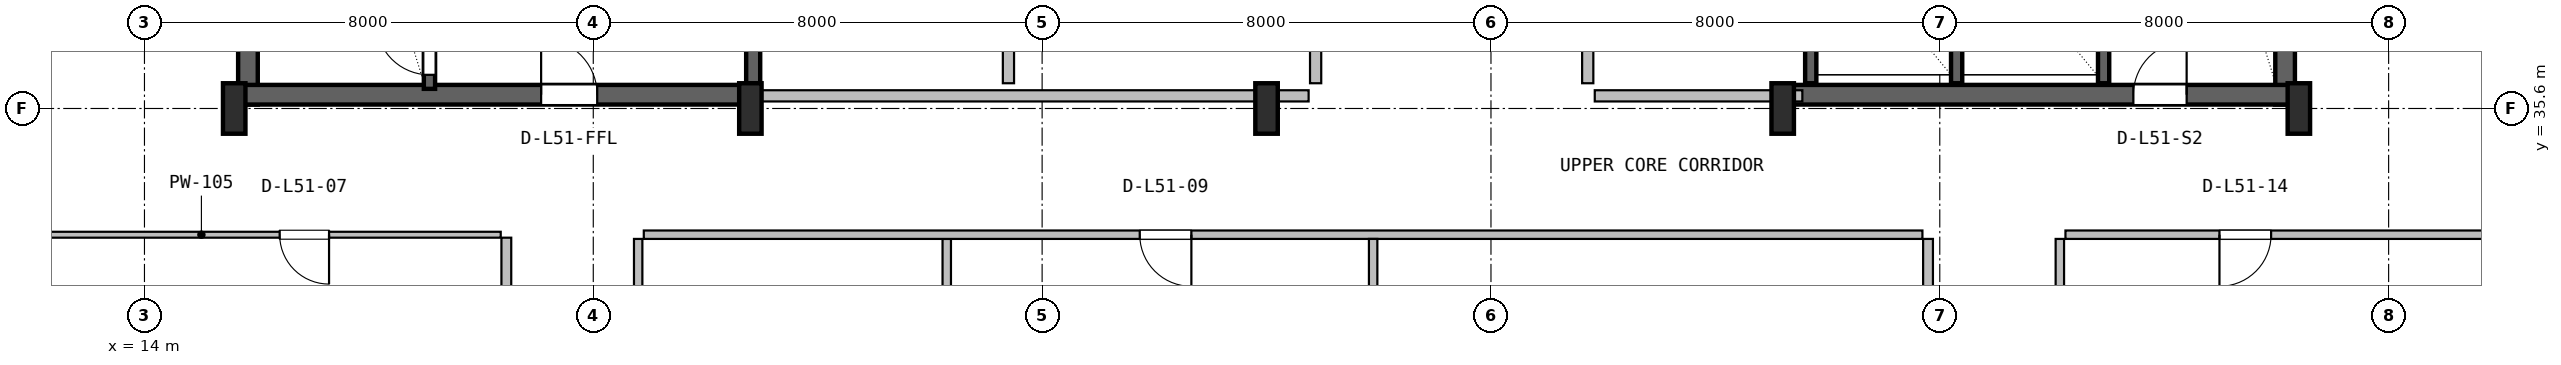
"""IFC4 building model, lengths in metres.
Left out: names, types, materials, properties, quantities, classifications, styles, units other than length and angle.
Written with IfcOpenShell. Run it as: python <this file> out.ifc"""

import sys

from ifc_helpers import new_model, si_unit, direction, frame, frame_2d, origin, origin_2d, place, context, subcontext, project, spatial, rectangle, i_section, extrude, source, transform, mapped, element, fill, save


model = new_model("IFC4")
c1 = context("Model", 3, precision=1e-05, world=origin(), true_north=direction((0.0, 1.0)))
c2 = subcontext(c1, "Body", "Model", "MODEL_VIEW")
j1 = project(units=[si_unit("LENGTHUNIT", "METRE"), si_unit("PLANEANGLEUNIT", "RADIAN")], contexts=[c1])
p1 = place(None, origin())
s1 = spatial("IfcSite", under=j1, at=p1, CompositionType="ELEMENT")
p2 = place(p1, origin())
s2 = spatial("IfcBuilding", under=s1, at=p2, CompositionType="ELEMENT")
p3 = place(p2, frame((0.0, 0.0, 207.4)))
s3 = spatial("IfcBuildingStorey", under=s2, at=p3, CompositionType="ELEMENT", Elevation=207.4)
for number, where, z_axis, x_axis in (
    (1, (15.845, 35.67, 0.0), (0.0, 0.0, 1.0), (0.0, 1.0, 0.0)),
    (2, (52.155, 35.67, 0.0), (0.0, 0.0, 1.0), (0.0, 1.0, 0.0)),
):
    element("IfcWall", number, at=place(p3, frame(where, z_axis=z_axis, x_axis=x_axis)), inside=s3, PredefinedType="SHEAR", context=c2, shape_type="SweptSolid", body=[
        extrude(rectangle(XDim=11.13, YDim=0.35, at=frame_2d((5.565, 0.0))), origin(), (0.0, 0.0, 1.0), 3.55),
    ])
p4 = place(p3, frame((15.67, 35.845, 0.0), z_axis=(0.0, 0.0, 1.0), x_axis=(1.0, 0.0, 0.0)))
e3 = element("IfcWall", 3, at=p4, inside=s3, PredefinedType="SHEAR", context=c2, shape_type="SweptSolid", body=[
    extrude(rectangle(XDim=9.13, YDim=0.35, at=frame_2d((4.565, 0.0))), origin(), (0.0, 0.0, 1.0), 3.55),
])
p5 = place(p4, frame((5.4, 0.0, 0.0)))
e4 = element("IfcOpeningElement", 4, at=p5, cuts=e3, PredefinedType="OPENING", context=c2, shape_type="SweptSolid", body=[
    extrude(rectangle(XDim=1.0, YDim=2.1, at=frame_2d((0.5, 1.05))), frame((0.0, 0.185, 0.0), z_axis=(0.0, -1.0, 0.0), x_axis=(1.0, 0.0, 0.0)), (0.0, 0.0, 1.0), 0.37),
])
p6 = place(p3, frame((43.2, 35.845, 0.0), z_axis=(0.0, 0.0, 1.0), x_axis=(1.0, 0.0, 0.0)))
e5 = element("IfcWall", 5, at=p6, inside=s3, PredefinedType="SHEAR", context=c2, shape_type="SweptSolid", body=[
    extrude(rectangle(XDim=9.13, YDim=0.35, at=frame_2d((4.565, 0.0))), origin(), (0.0, 0.0, 1.0), 3.55),
])
p7 = place(p6, frame((6.25, 0.0, 0.0)))
e6 = element("IfcOpeningElement", 6, at=p7, cuts=e5, PredefinedType="OPENING", context=c2, shape_type="SweptSolid", body=[
    extrude(rectangle(XDim=0.95, YDim=2.1, at=frame_2d((0.475, 1.05))), frame((0.0, 0.185, 0.0), z_axis=(0.0, -1.0, 0.0), x_axis=(1.0, 0.0, 0.0)), (0.0, 0.0, 1.0), 0.37),
])
m1 = source(origin(), c2, "Body", "SweptSolid", [
    extrude(i_section(OverallWidth=0.4, OverallDepth=0.9, WebThickness=0.016, FlangeThickness=0.028, FilletRadius=0.016, at=origin_2d()), origin(), (0.0, 0.0, 1.0), 3.8),
])
for number, where, z_axis, x_axis in (
    (7, (15.6, 35.6, 0.0), (0.0, 0.0, 1.0), (1.0, 0.0, 0.0)),
    (8, (24.8, 35.6, 0.0), (0.0, 0.0, 1.0), (1.0, 0.0, 0.0)),
    (9, (34.0, 35.6, 0.0), (0.0, 0.0, 1.0), (1.0, 0.0, 0.0)),
    (10, (43.2, 35.6, 0.0), (0.0, 0.0, 1.0), (1.0, 0.0, 0.0)),
    (11, (52.4, 35.6, 0.0), (0.0, 0.0, 1.0), (1.0, 0.0, 0.0)),
):
    element("IfcColumn", number, at=place(p3, frame(where, z_axis=z_axis, x_axis=x_axis)), inside=s3, PredefinedType="COLUMN", context=c2, shape_type="MappedRepresentation", body=[
        mapped(m1, transform((0.0, 0.0, 0.0), x_axis=(1.0, 0.0, 0.0), y_axis=(0.0, 1.0, 0.0), z_axis=(0.0, 0.0, 1.0), scale=1.0)),
    ])
p8 = place(p3, frame((19.08, 35.95, 0.0), z_axis=(0.0, 0.0, 1.0), x_axis=(0.0, 1.0, 0.0)))
e12 = element("IfcWall", 12, at=p8, inside=s3, PredefinedType="SHEAR", context=c2, shape_type="SweptSolid", body=[
    extrude(rectangle(XDim=9.65, YDim=0.2, at=frame_2d((4.825, 0.0))), origin(), (0.0, 0.0, 1.0), 3.55),
])
p9 = place(p8, frame((0.25, 0.0, 0.0)))
e13 = element("IfcOpeningElement", 13, at=p9, cuts=e12, PredefinedType="OPENING", context=c2, shape_type="SweptSolid", body=[
    extrude(rectangle(XDim=0.95, YDim=2.1, at=frame_2d((0.475, 1.05))), frame((0.0, 0.11, 0.0), z_axis=(0.0, -1.0, 0.0), x_axis=(1.0, 0.0, 0.0)), (0.0, 0.0, 1.0), 0.22),
])
p10 = place(p3, frame((24.85, 36.05, 0.0), z_axis=(0.0, 0.0, 1.0), x_axis=(0.0, 1.0, 0.0)))
e14 = element("IfcWall", 14, at=p10, inside=s3, PredefinedType="SHEAR", context=c2, shape_type="SweptSolid", body=[
    extrude(rectangle(XDim=10.45, YDim=0.25, at=frame_2d((5.225, 0.0))), origin(), (0.0, 0.0, 1.0), 3.55),
])
p11 = place(p3, frame((48.92, 36.05, 0.0), z_axis=(0.0, 0.0, 1.0), x_axis=(0.0, 1.0, 0.0)))
e15 = element("IfcWall", 15, at=p11, inside=s3, PredefinedType="SHEAR", context=c2, shape_type="SweptSolid", body=[
    extrude(rectangle(XDim=10.5, YDim=0.2, at=frame_2d((5.25, 0.0))), origin(), (0.0, 0.0, 1.0), 3.55),
])
for number, where, z_axis, x_axis in (
    (16, (43.7, 36.05, 0.0), (0.0, 0.0, 1.0), (0.0, 1.0, 0.0)),
    (17, (46.3, 36.05, 0.0), (0.0, 0.0, 1.0), (0.0, 1.0, 0.0)),
):
    element("IfcWall", number, at=place(p3, frame(where, z_axis=z_axis, x_axis=x_axis)), inside=s3, PredefinedType="SHEAR", context=c2, shape_type="SweptSolid", body=[
        extrude(rectangle(XDim=3.05, YDim=0.2, at=frame_2d((1.525, 0.0))), origin(), (0.0, 0.0, 1.0), 3.55),
    ])
p12 = place(p3, frame((25.0, 35.825, 0.0), z_axis=(0.0, 0.0, 1.0), x_axis=(1.0, 0.0, 0.0)))
e18 = element("IfcWall", 18, at=p12, inside=s3, PredefinedType="PLUMBINGWALL", context=c2, shape_type="SweptSolid", body=[
    extrude(rectangle(XDim=9.75, YDim=0.2, at=frame_2d((4.875, 0.0))), origin(), (0.0, 0.0, 1.0), 2.575),
])
for number, where, z_axis, x_axis in (
    (19, (29.4, 36.05, 0.0), (0.0, 0.0, 1.0), (0.0, 1.0, 0.0)),
    (20, (34.875, 36.05, 0.0), (0.0, 0.0, 1.0), (0.0, 1.0, 0.0)),
):
    element("IfcWall", number, at=place(p3, frame(where, z_axis=z_axis, x_axis=x_axis)), inside=s3, PredefinedType="PLUMBINGWALL", context=c2, shape_type="SweptSolid", body=[
        extrude(rectangle(XDim=3.1, YDim=0.2, at=frame_2d((1.55, 0.0))), origin(), (0.0, 0.0, 1.0), 3.53),
    ])
p13 = place(p3, frame((39.85, 35.825, 0.0), z_axis=(0.0, 0.0, 1.0), x_axis=(1.0, 0.0, 0.0)))
e21 = element("IfcWall", 21, at=p13, inside=s3, PredefinedType="SOLIDWALL", context=c2, shape_type="SweptSolid", body=[
    extrude(rectangle(XDim=3.7, YDim=0.2, at=frame_2d((1.85, 0.0))), origin(), (0.0, 0.0, 1.0), 2.575),
])
p14 = place(p3, frame((39.725, 36.05, 0.0), z_axis=(0.0, 0.0, 1.0), x_axis=(0.0, 1.0, 0.0)))
e22 = element("IfcWall", 22, at=p14, inside=s3, PredefinedType="SOLIDWALL", context=c2, shape_type="SweptSolid", body=[
    extrude(rectangle(XDim=3.1, YDim=0.2, at=frame_2d((1.55, 0.0))), origin(), (0.0, 0.0, 1.0), 3.53),
])
p15 = place(p3, frame((20.45, 10.38, 0.0), z_axis=(0.0, 0.0, 1.0), x_axis=(0.0, 1.0, 0.0)))
e23 = element("IfcWall", 23, at=p15, inside=s3, PredefinedType="PARTITIONING", context=c2, shape_type="SweptSolid", body=[
    extrude(rectangle(XDim=22.917, YDim=0.175, at=frame_2d((11.458, 0.0))), origin(), (0.0, 0.0, 1.0), 3.171),
])
p16 = place(p15, frame((2.935, 0.0, 0.0)))
e24 = element("IfcOpeningElement", 24, at=p16, cuts=e23, PredefinedType="OPENING", context=c2, shape_type="SweptSolid", body=[
    extrude(rectangle(XDim=1.05, YDim=2.1, at=frame_2d((0.525, 1.05))), frame((0.0, 0.098, 0.0), z_axis=(0.0, -1.0, 0.0), x_axis=(1.0, 0.0, 0.0)), (0.0, 0.0, 1.0), 0.195),
])
p17 = place(p15, frame((9.29, 0.0, 0.0)))
e25 = element("IfcOpeningElement", 25, at=p17, cuts=e23, PredefinedType="OPENING", context=c2, shape_type="SweptSolid", body=[
    extrude(rectangle(XDim=0.88, YDim=2.06, at=frame_2d((0.44, 1.03))), frame((0.0, 0.098, 0.0), z_axis=(0.0, -1.0, 0.0), x_axis=(1.0, 0.0, 0.0)), (0.0, 0.0, 1.0), 0.195),
])
p18 = place(p15, frame((14.815, 0.0, 0.0)))
e26 = element("IfcOpeningElement", 26, at=p18, cuts=e23, PredefinedType="OPENING", context=c2, shape_type="SweptSolid", body=[
    extrude(rectangle(XDim=1.0, YDim=2.1, at=frame_2d((0.5, 1.05))), frame((0.0, 0.098, 0.0), z_axis=(0.0, -1.0, 0.0), x_axis=(1.0, 0.0, 0.0)), (0.0, 0.0, 1.0), 0.195),
])
p19 = place(p3, frame((9.68, 33.35, 0.0), z_axis=(0.0, 0.0, 1.0), x_axis=(1.0, 0.0, 0.0)))
e27 = element("IfcWall", 27, at=p19, inside=s3, PredefinedType="PARTITIONING", context=c2, shape_type="SweptSolid", body=[
    extrude(rectangle(XDim=10.67, YDim=0.105, at=frame_2d((5.335, 0.0))), origin(), (0.0, 0.0, 1.0), 3.171),
])
p20 = place(p19, frame((6.73, 0.0, 0.0)))
e28 = element("IfcOpeningElement", 28, at=p20, cuts=e27, PredefinedType="OPENING", context=c2, shape_type="SweptSolid", body=[
    extrude(rectangle(XDim=0.88, YDim=2.06, at=frame_2d((0.44, 1.03))), frame((0.0, 0.062, 0.0), z_axis=(0.0, -1.0, 0.0), x_axis=(1.0, 0.0, 0.0)), (0.0, 0.0, 1.0), 0.125),
])
p21 = place(p3, frame((28.3, 10.38, 0.0), z_axis=(0.0, 0.0, 1.0), x_axis=(0.0, 1.0, 0.0)))
e29 = element("IfcWall", 29, at=p21, inside=s3, PredefinedType="PARTITIONING", context=c2, shape_type="SweptSolid", body=[
    extrude(rectangle(XDim=22.895, YDim=0.15, at=frame_2d((11.448, 0.0))), origin(), (0.0, 0.0, 1.0), 2.908),
])
p22 = place(p3, frame((22.9, 33.35, 0.0), z_axis=(0.0, 0.0, 1.0), x_axis=(1.0, 0.0, 0.0)))
e30 = element("IfcWall", 30, at=p22, inside=s3, PredefinedType="PARTITIONING", context=c2, shape_type="SweptSolid", body=[
    extrude(rectangle(XDim=22.79, YDim=0.15, at=frame_2d((11.395, 0.0))), origin(), (0.0, 0.0, 1.0), 2.908),
])
p23 = place(p22, frame((8.84, 0.0, 0.0)))
e31 = element("IfcOpeningElement", 31, at=p23, cuts=e30, PredefinedType="OPENING", context=c2, shape_type="SweptSolid", body=[
    extrude(rectangle(XDim=0.92, YDim=2.08, at=frame_2d((0.46, 1.04))), frame((0.0, 0.085, 0.0), z_axis=(0.0, -1.0, 0.0), x_axis=(1.0, 0.0, 0.0)), (0.0, 0.0, 1.0), 0.17),
])
p24 = place(p3, frame((22.8, 10.38, 0.0), z_axis=(0.0, 0.0, 1.0), x_axis=(0.0, 1.0, 0.0)))
e32 = element("IfcWall", 32, at=p24, inside=s3, PredefinedType="PARTITIONING", context=c2, shape_type="SweptSolid", body=[
    extrude(rectangle(XDim=22.895, YDim=0.15, at=frame_2d((11.448, 0.0))), origin(), (0.0, 0.0, 1.0), 3.171),
])
p25 = place(p24, frame((11.43, 0.0, 0.0)))
e33 = element("IfcOpeningElement", 33, at=p25, cuts=e32, PredefinedType="OPENING", context=c2, shape_type="SweptSolid", body=[
    extrude(rectangle(XDim=0.92, YDim=2.08, at=frame_2d((0.46, 1.04))), frame((0.0, 0.085, 0.0), z_axis=(0.0, -1.0, 0.0), x_axis=(1.0, 0.0, 0.0)), (0.0, 0.0, 1.0), 0.17),
])
p26 = place(p3, frame((35.9, 10.38, 0.0), z_axis=(0.0, 0.0, 1.0), x_axis=(0.0, 1.0, 0.0)))
e34 = element("IfcWall", 34, at=p26, inside=s3, PredefinedType="PARTITIONING", context=c2, shape_type="SweptSolid", body=[
    extrude(rectangle(XDim=22.895, YDim=0.15, at=frame_2d((11.448, 0.0))), origin(), (0.0, 0.0, 1.0), 2.908),
])
p27 = place(p3, frame((45.79, 10.38, 0.0), z_axis=(0.0, 0.0, 1.0), x_axis=(0.0, 1.0, 0.0)))
e35 = element("IfcWall", 35, at=p27, inside=s3, PredefinedType="PARTITIONING", context=c2, shape_type="SweptSolid", body=[
    extrude(rectangle(XDim=22.895, YDim=0.175, at=frame_2d((11.448, 0.0))), origin(), (0.0, 0.0, 1.0), 2.908),
])
p28 = place(p27, frame((11.365, 0.0, 0.0)))
e36 = element("IfcOpeningElement", 36, at=p28, cuts=e35, PredefinedType="OPENING", context=c2, shape_type="SweptSolid", body=[
    extrude(rectangle(XDim=1.05, YDim=2.1, at=frame_2d((0.525, 1.05))), frame((0.0, 0.098, 0.0), z_axis=(0.0, -1.0, 0.0), x_axis=(1.0, 0.0, 0.0)), (0.0, 0.0, 1.0), 0.195),
])
p29 = place(p3, frame((48.14, 10.38, 0.0), z_axis=(0.0, 0.0, 1.0), x_axis=(0.0, 1.0, 0.0)))
e37 = element("IfcWall", 37, at=p29, inside=s3, PredefinedType="PARTITIONING", context=c2, shape_type="SweptSolid", body=[
    extrude(rectangle(XDim=22.895, YDim=0.15, at=frame_2d((11.448, 0.0))), origin(), (0.0, 0.0, 1.0), 3.171),
])
p30 = place(p29, frame((2.35, 0.0, 0.0)))
e38 = element("IfcOpeningElement", 38, at=p30, cuts=e37, PredefinedType="OPENING", context=c2, shape_type="SweptSolid", body=[
    extrude(rectangle(XDim=0.88, YDim=2.06, at=frame_2d((0.44, 1.03))), frame((0.0, 0.085, 0.0), z_axis=(0.0, -1.0, 0.0), x_axis=(1.0, 0.0, 0.0)), (0.0, 0.0, 1.0), 0.17),
])
p31 = place(p29, frame((7.285, 0.0, 0.0)))
e39 = element("IfcOpeningElement", 39, at=p31, cuts=e37, PredefinedType="OPENING", context=c2, shape_type="SweptSolid", body=[
    extrude(rectangle(XDim=1.0, YDim=2.1, at=frame_2d((0.5, 1.05))), frame((0.0, 0.085, 0.0), z_axis=(0.0, -1.0, 0.0), x_axis=(1.0, 0.0, 0.0)), (0.0, 0.0, 1.0), 0.17),
])
p32 = place(p29, frame((14.27, 0.0, 0.0)))
e40 = element("IfcOpeningElement", 40, at=p32, cuts=e37, PredefinedType="OPENING", context=c2, shape_type="SweptSolid", body=[
    extrude(rectangle(XDim=0.88, YDim=2.06, at=frame_2d((0.44, 1.03))), frame((0.0, 0.085, 0.0), z_axis=(0.0, -1.0, 0.0), x_axis=(1.0, 0.0, 0.0)), (0.0, 0.0, 1.0), 0.17),
])
p33 = place(p3, frame((48.24, 33.35, 0.0), z_axis=(0.0, 0.0, 1.0), x_axis=(1.0, 0.0, 0.0)))
e41 = element("IfcWall", 41, at=p33, inside=s3, PredefinedType="PARTITIONING", context=c2, shape_type="SweptSolid", body=[
    extrude(rectangle(XDim=10.08, YDim=0.15, at=frame_2d((5.04, 0.0))), origin(), (0.0, 0.0, 1.0), 3.171),
])
p34 = place(p33, frame((2.745, 0.0, 0.0)))
e42 = element("IfcOpeningElement", 42, at=p34, cuts=e41, PredefinedType="OPENING", context=c2, shape_type="SweptSolid", body=[
    extrude(rectangle(XDim=0.92, YDim=2.08, at=frame_2d((0.46, 1.04))), frame((0.0, 0.085, 0.0), z_axis=(0.0, -1.0, 0.0), x_axis=(1.0, 0.0, 0.0)), (0.0, 0.0, 1.0), 0.17),
])
m2 = source(origin(), c2, "Body", "SweptSolid", [
    extrude(rectangle(XDim=0.95, YDim=2.1, at=frame_2d((0.475, 1.05))), frame((0.0, 0.025, 0.0), z_axis=(0.0, -1.0, 0.0), x_axis=(1.0, 0.0, 0.0)), (0.0, 0.0, 1.0), 0.05),
])
p35 = place(p9, origin())
e43 = element("IfcDoor", 43, at=p35, inside=s3, OperationType="SINGLE_SWING_RIGHT", PredefinedType="DOOR", context=c2, shape_type="MappedRepresentation", body=[
    mapped(m2, transform((0.0, 0.0, 0.0), x_axis=(1.0, 0.0, 0.0), y_axis=(0.0, 1.0, 0.0), z_axis=(0.0, 0.0, 1.0), scale=1.0)),
])
fill(e13, e43)
m3 = source(origin(), c2, "Body", "SweptSolid", [
    extrude(rectangle(XDim=1.0, YDim=2.1, at=frame_2d((0.5, 1.05))), frame((0.0, 0.025, 0.0), z_axis=(0.0, -1.0, 0.0), x_axis=(1.0, 0.0, 0.0)), (0.0, 0.0, 1.0), 0.05),
])
p36 = place(p5, origin())
e44 = element("IfcDoor", 44, at=p36, inside=s3, OperationType="SINGLE_SWING_LEFT", PredefinedType="DOOR", context=c2, shape_type="MappedRepresentation", body=[
    mapped(m3, transform((0.0, 0.0, 0.0), x_axis=(1.0, 0.0, 0.0), y_axis=(0.0, 1.0, 0.0), z_axis=(0.0, 0.0, 1.0), scale=1.0)),
])
fill(e4, e44)
p37 = place(p7, origin())
e45 = element("IfcDoor", 45, at=p37, inside=s3, OperationType="SINGLE_SWING_RIGHT", PredefinedType="DOOR", context=c2, shape_type="MappedRepresentation", body=[
    mapped(m2, transform((0.0, 0.0, 0.0), x_axis=(1.0, 0.0, 0.0), y_axis=(0.0, 1.0, 0.0), z_axis=(0.0, 0.0, 1.0), scale=1.0)),
])
fill(e6, e45)
m4 = source(origin(), c2, "Body", "SweptSolid", [
    extrude(rectangle(XDim=0.88, YDim=2.06, at=frame_2d((0.44, 1.03))), frame((0.0, 0.025, 0.0), z_axis=(0.0, -1.0, 0.0), x_axis=(1.0, 0.0, 0.0)), (0.0, 0.0, 1.0), 0.05),
])
p38 = place(p20, frame((0.88, 0.0, 0.0), z_axis=(0.0, 0.0, 1.0), x_axis=(-1.0, 0.0, 0.0)))
e46 = element("IfcDoor", 46, at=p38, inside=s3, OperationType="SINGLE_SWING_RIGHT", PredefinedType="DOOR", context=c2, shape_type="MappedRepresentation", body=[
    mapped(m4, transform((0.0, 0.0, 0.0), x_axis=(1.0, 0.0, 0.0), y_axis=(0.0, 1.0, 0.0), z_axis=(0.0, 0.0, 1.0), scale=1.0)),
])
fill(e28, e46)
m5 = source(origin(), c2, "Body", "SweptSolid", [
    extrude(rectangle(XDim=0.92, YDim=2.08, at=frame_2d((0.46, 1.04))), frame((0.0, 0.025, 0.0), z_axis=(0.0, -1.0, 0.0), x_axis=(1.0, 0.0, 0.0)), (0.0, 0.0, 1.0), 0.05),
])
p39 = place(p23, frame((0.92, 0.0, 0.0), z_axis=(0.0, 0.0, 1.0), x_axis=(-1.0, 0.0, 0.0)))
e47 = element("IfcDoor", 47, at=p39, inside=s3, OperationType="SINGLE_SWING_RIGHT", PredefinedType="DOOR", context=c2, shape_type="MappedRepresentation", body=[
    mapped(m5, transform((0.0, 0.0, 0.0), x_axis=(1.0, 0.0, 0.0), y_axis=(0.0, 1.0, 0.0), z_axis=(0.0, 0.0, 1.0), scale=1.0)),
])
fill(e31, e47)
p40 = place(p34, frame((0.92, 0.0, 0.0), z_axis=(0.0, 0.0, 1.0), x_axis=(-1.0, 0.0, 0.0)))
e48 = element("IfcDoor", 48, at=p40, inside=s3, OperationType="SINGLE_SWING_LEFT", PredefinedType="DOOR", context=c2, shape_type="MappedRepresentation", body=[
    mapped(m5, transform((0.0, 0.0, 0.0), x_axis=(1.0, 0.0, 0.0), y_axis=(0.0, 1.0, 0.0), z_axis=(0.0, 0.0, 1.0), scale=1.0)),
])
fill(e42, e48)
save(model, sys.argv[1])
